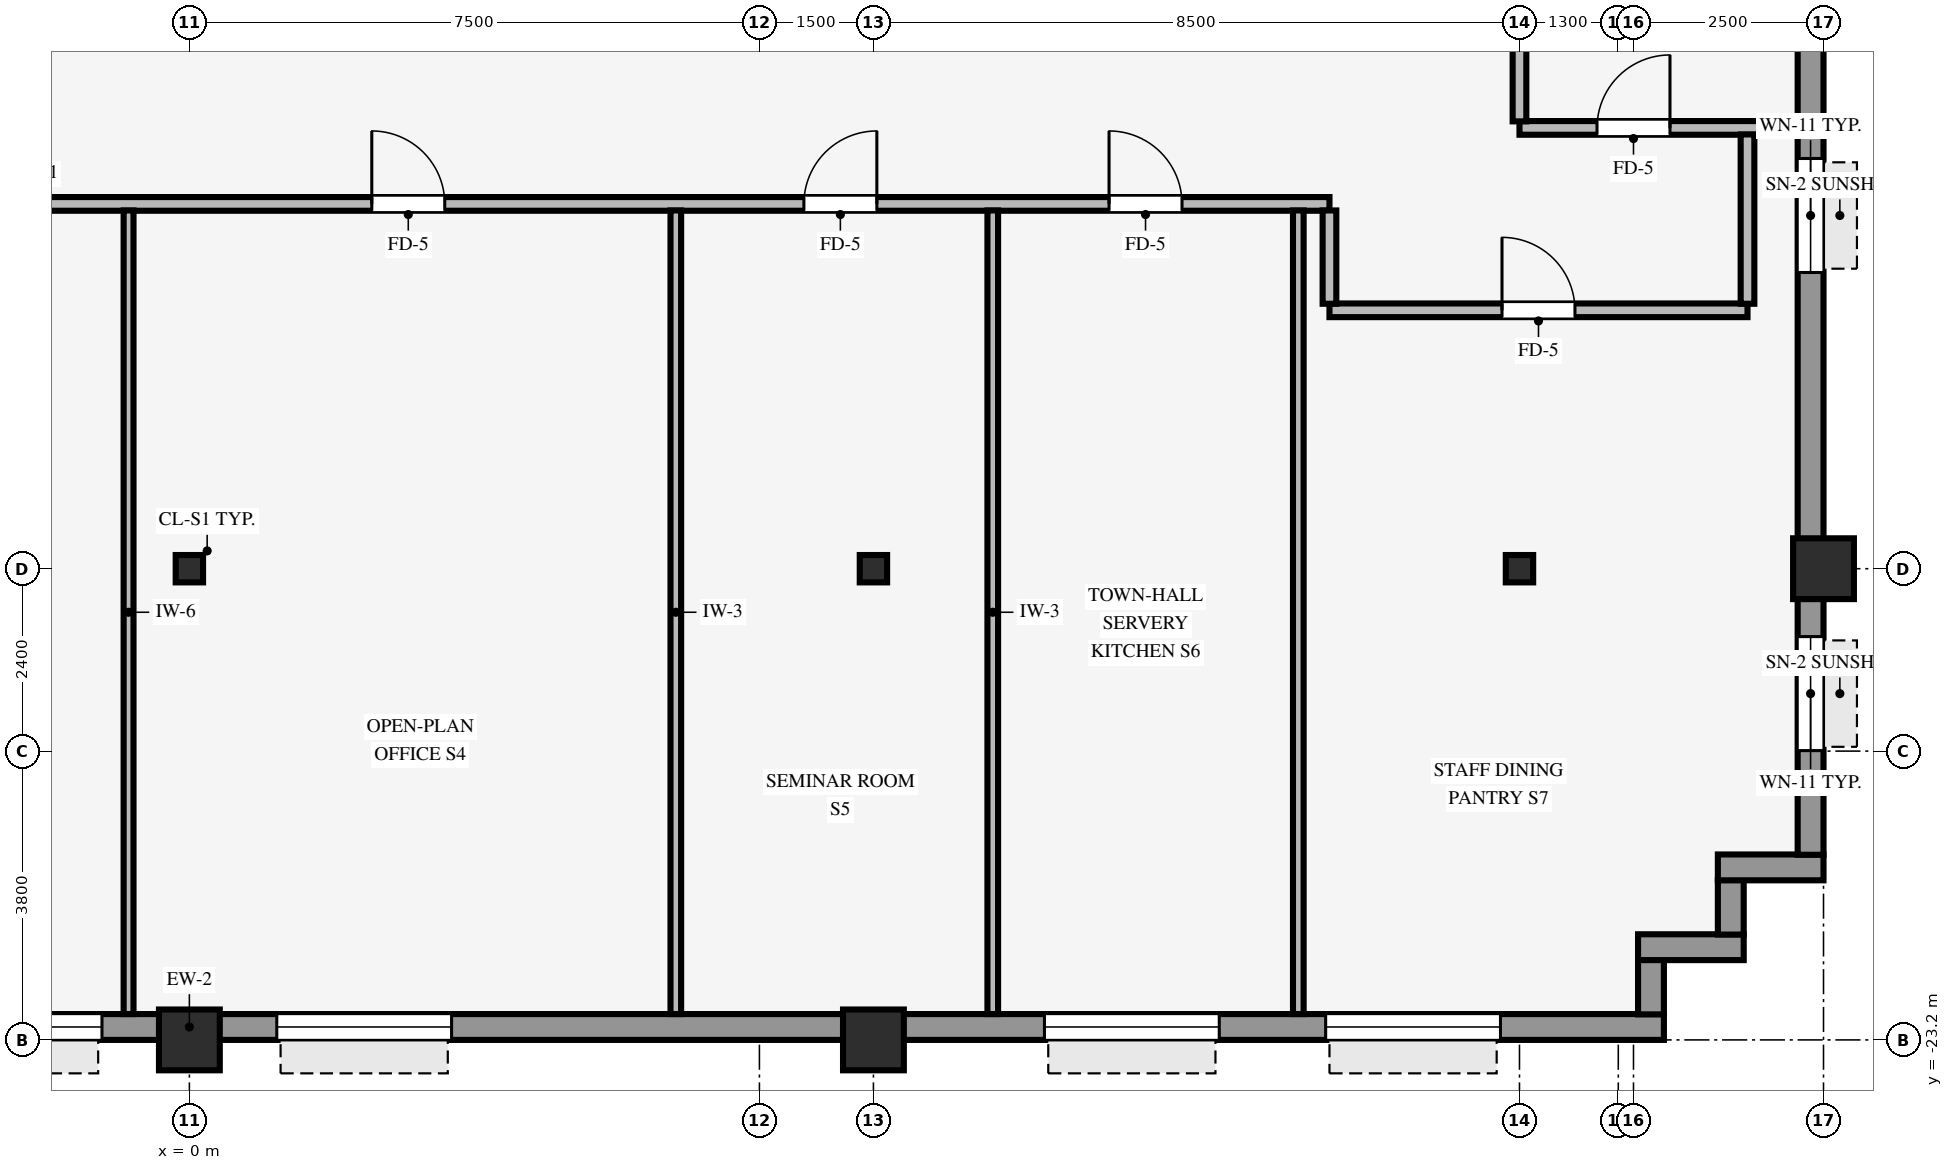
"""IFC4 building model, lengths in metres.
Left out: names, types, materials, properties, quantities, classifications, styles, units other than length and angle.
Written with IfcOpenShell. Run it as: python <this file> out.ifc"""

import sys

from ifc_helpers import new_model, si_unit, direction, frame, frame_2d, origin, origin_2d, place, context, subcontext, project, spatial, rectangle, hollow_rectangle, i_section, extrude, source, transform, mapped, element, fill, save


model = new_model("IFC4")
c1 = context("Model", 3, precision=1e-05, world=origin(), true_north=direction((0.0, 1.0)))
c2 = subcontext(c1, "Body", "Model", "MODEL_VIEW")
j1 = project(units=[si_unit("LENGTHUNIT", "METRE"), si_unit("PLANEANGLEUNIT", "RADIAN")], contexts=[c1])
p1 = place(None, origin())
s1 = spatial("IfcSite", under=j1, at=p1, CompositionType="ELEMENT")
p2 = place(p1, origin())
s2 = spatial("IfcBuilding", under=s1, at=p2, CompositionType="ELEMENT")
p3 = place(p2, frame((0.0, 0.0, 56.8)))
s3 = spatial("IfcBuildingStorey", under=s2, at=p3, CompositionType="ELEMENT", Elevation=56.8)
p4 = place(p3, frame((21.5, -17.0, -0.4), z_axis=(0.0, 0.0, 1.0), x_axis=(1.0, 0.0, 0.0)))
e1 = element("IfcColumn", 1, at=p4, inside=s3, PredefinedType="COLUMN", context=c2, shape_type="SweptSolid", body=[
    extrude(hollow_rectangle(XDim=0.8, YDim=0.8, WallThickness=0.055, InnerFilletRadius=0.055, OuterFilletRadius=0.11, at=origin_2d()), origin(), (0.0, 0.0, 1.0), 3.77),
])
for number, where, z_axis, x_axis in (
    (2, (0.0, -23.2, 0.0), (0.0, 0.0, 1.0), (1.0, 0.0, 0.0)),
    (3, (9.0, -23.2, 0.0), (0.0, 0.0, 1.0), (1.0, 0.0, 0.0)),
):
    element("IfcColumn", number, at=place(p3, frame(where, z_axis=z_axis, x_axis=x_axis)), inside=s3, PredefinedType="COLUMN", context=c2, shape_type="SweptSolid", body=[
        extrude(hollow_rectangle(XDim=0.8, YDim=0.8, WallThickness=0.055, InnerFilletRadius=0.055, OuterFilletRadius=0.11, at=origin_2d()), origin(), (0.0, 0.0, 1.0), 3.37),
    ])
for number, where, z_axis, x_axis in (
    (4, (0.0, -17.0, 0.0), (0.0, 0.0, 1.0), (1.0, 0.0, 0.0)),
    (5, (9.0, -17.0, 0.0), (0.0, 0.0, 1.0), (1.0, 0.0, 0.0)),
    (6, (17.5, -17.0, 0.0), (0.0, 0.0, 1.0), (1.0, 0.0, 0.0)),
):
    element("IfcColumn", number, at=place(p3, frame(where, z_axis=z_axis, x_axis=x_axis)), inside=s3, PredefinedType="COLUMN", context=c2, shape_type="SweptSolid", body=[
        extrude(i_section(OverallWidth=0.36, OverallDepth=0.36, WebThickness=0.021, FlangeThickness=0.021, FilletRadius=0.018, at=origin_2d()), origin(), (0.0, 0.0, 1.0), 3.37),
    ])
p5 = place(p3, frame((-19.4, -23.03, 0.0), z_axis=(0.0, 0.0, 1.0), x_axis=(1.0, 0.0, 0.0)))
e7 = element("IfcWall", 7, at=p5, inside=s3, PredefinedType="STANDARD", context=c2, shape_type="SweptSolid", body=[
    extrude(rectangle(XDim=38.8, YDim=0.34, at=frame_2d((19.4, 0.0))), origin(), (0.0, 0.0, 1.0), 2.705),
])
p6 = place(p5, frame((3.05, 0.0, 0.8)))
e8 = element("IfcOpeningElement", 8, at=p6, cuts=e7, PredefinedType="OPENING", context=c2, shape_type="SweptSolid", body=[
    extrude(rectangle(XDim=2.3, YDim=1.62, at=frame_2d((1.15, 0.81))), frame((0.0, 0.18, 0.0), z_axis=(0.0, -1.0, 0.0), x_axis=(1.0, 0.0, 0.0)), (0.0, 0.0, 1.0), 0.36),
])
p7 = place(p5, frame((5.85, 0.0, 0.8)))
e9 = element("IfcOpeningElement", 9, at=p7, cuts=e7, PredefinedType="OPENING", context=c2, shape_type="SweptSolid", body=[
    extrude(rectangle(XDim=2.3, YDim=1.62, at=frame_2d((1.15, 0.81))), frame((0.0, 0.18, 0.0), z_axis=(0.0, -1.0, 0.0), x_axis=(1.0, 0.0, 0.0)), (0.0, 0.0, 1.0), 0.36),
])
p8 = place(p5, frame((11.35, 0.0, 0.8)))
e10 = element("IfcOpeningElement", 10, at=p8, cuts=e7, PredefinedType="OPENING", context=c2, shape_type="SweptSolid", body=[
    extrude(rectangle(XDim=2.3, YDim=1.62, at=frame_2d((1.15, 0.81))), frame((0.0, 0.18, 0.0), z_axis=(0.0, -1.0, 0.0), x_axis=(1.0, 0.0, 0.0)), (0.0, 0.0, 1.0), 0.36),
])
p9 = place(p5, frame((15.95, 0.0, 0.8)))
e11 = element("IfcOpeningElement", 11, at=p9, cuts=e7, PredefinedType="OPENING", context=c2, shape_type="SweptSolid", body=[
    extrude(rectangle(XDim=2.3, YDim=1.62, at=frame_2d((1.15, 0.81))), frame((0.0, 0.18, 0.0), z_axis=(0.0, -1.0, 0.0), x_axis=(1.0, 0.0, 0.0)), (0.0, 0.0, 1.0), 0.36),
])
p10 = place(p5, frame((20.55, 0.0, 0.8)))
e12 = element("IfcOpeningElement", 12, at=p10, cuts=e7, PredefinedType="OPENING", context=c2, shape_type="SweptSolid", body=[
    extrude(rectangle(XDim=2.3, YDim=1.62, at=frame_2d((1.15, 0.81))), frame((0.0, 0.18, 0.0), z_axis=(0.0, -1.0, 0.0), x_axis=(1.0, 0.0, 0.0)), (0.0, 0.0, 1.0), 0.36),
])
p11 = place(p5, frame((30.65, 0.0, 0.8)))
e13 = element("IfcOpeningElement", 13, at=p11, cuts=e7, PredefinedType="OPENING", context=c2, shape_type="SweptSolid", body=[
    extrude(rectangle(XDim=2.3, YDim=1.62, at=frame_2d((1.15, 0.81))), frame((0.0, 0.18, 0.0), z_axis=(0.0, -1.0, 0.0), x_axis=(1.0, 0.0, 0.0)), (0.0, 0.0, 1.0), 0.36),
])
p12 = place(p5, frame((34.35, 0.0, 0.8)))
e14 = element("IfcOpeningElement", 14, at=p12, cuts=e7, PredefinedType="OPENING", context=c2, shape_type="SweptSolid", body=[
    extrude(rectangle(XDim=2.3, YDim=1.62, at=frame_2d((1.15, 0.81))), frame((0.0, 0.18, 0.0), z_axis=(0.0, -1.0, 0.0), x_axis=(1.0, 0.0, 0.0)), (0.0, 0.0, 1.0), 0.36),
])
p13 = place(p3, frame((19.23, -22.864, 0.0), z_axis=(0.0, 0.0, 1.0), x_axis=(0.0, 1.0, 0.0)))
e15 = element("IfcWall", 15, at=p13, inside=s3, PredefinedType="STANDARD", context=c2, shape_type="SweptSolid", body=[
    extrude(rectangle(XDim=0.718, YDim=0.34, at=frame_2d((0.359, 0.0))), origin(), (0.0, 0.0, 1.0), 3.36),
])
p14 = place(p3, frame((19.06, -21.98, 0.0), z_axis=(0.0, 0.0, 1.0), x_axis=(1.0, 0.0, 0.0)))
e16 = element("IfcWall", 16, at=p14, inside=s3, PredefinedType="STANDARD", context=c2, shape_type="SweptSolid", body=[
    extrude(rectangle(XDim=1.39, YDim=0.34, at=frame_2d((0.695, 0.0))), origin(), (0.0, 0.0, 1.0), 3.36),
])
p15 = place(p3, frame((20.28, -21.814, 0.0), z_axis=(0.0, 0.0, 1.0), x_axis=(0.0, 1.0, 0.0)))
e17 = element("IfcWall", 17, at=p15, inside=s3, PredefinedType="STANDARD", context=c2, shape_type="SweptSolid", body=[
    extrude(rectangle(XDim=0.718, YDim=0.34, at=frame_2d((0.359, 0.0))), origin(), (0.0, 0.0, 1.0), 3.36),
])
p16 = place(p3, frame((20.11, -20.93, 0.0), z_axis=(0.0, 0.0, 1.0), x_axis=(1.0, 0.0, 0.0)))
e18 = element("IfcWall", 18, at=p16, inside=s3, PredefinedType="STANDARD", context=c2, shape_type="SweptSolid", body=[
    extrude(rectangle(XDim=1.39, YDim=0.34, at=frame_2d((0.695, 0.0))), origin(), (0.0, 0.0, 1.0), 3.36),
])
p17 = place(p3, frame((21.33, -20.764, 0.0), z_axis=(0.0, 0.0, 1.0), x_axis=(0.0, 1.0, 0.0)))
e19 = element("IfcWall", 19, at=p17, inside=s3, PredefinedType="STANDARD", context=c2, shape_type="SweptSolid", body=[
    extrude(rectangle(XDim=41.528, YDim=0.34, at=frame_2d((20.764, 0.0))), origin(), (0.0, 0.0, 1.0), 2.705),
])
p18 = place(p17, frame((26.014, 0.0, 0.0), z_axis=(0.0, 0.0, 1.0), x_axis=(-1.0, 0.0, 0.0)))
e20 = element("IfcOpeningElement", 20, at=p18, cuts=e19, PredefinedType="OPENING", context=c2, shape_type="SweptSolid", body=[
    extrude(rectangle(XDim=1.05, YDim=2.1, at=frame_2d((0.525, 1.05))), frame((0.0, 0.18, 0.0), z_axis=(0.0, -1.0, 0.0), x_axis=(1.0, 0.0, 0.0)), (0.0, 0.0, 1.0), 0.36),
])
p19 = place(p17, frame((1.371, 0.0, 0.8)))
e21 = element("IfcOpeningElement", 21, at=p19, cuts=e19, PredefinedType="OPENING", context=c2, shape_type="SweptSolid", body=[
    extrude(rectangle(XDim=1.5, YDim=1.6, at=frame_2d((0.75, 0.8))), frame((0.0, 0.18, 0.0), z_axis=(0.0, -1.0, 0.0), x_axis=(1.0, 0.0, 0.0)), (0.0, 0.0, 1.0), 0.36),
])
p20 = place(p17, frame((7.662, 0.0, 0.8)))
e22 = element("IfcOpeningElement", 22, at=p20, cuts=e19, PredefinedType="OPENING", context=c2, shape_type="SweptSolid", body=[
    extrude(rectangle(XDim=1.5, YDim=1.6, at=frame_2d((0.75, 0.8))), frame((0.0, 0.18, 0.0), z_axis=(0.0, -1.0, 0.0), x_axis=(1.0, 0.0, 0.0)), (0.0, 0.0, 1.0), 0.36),
])
p21 = place(p17, frame((12.603, 0.0, 0.8)))
e23 = element("IfcOpeningElement", 23, at=p21, cuts=e19, PredefinedType="OPENING", context=c2, shape_type="SweptSolid", body=[
    extrude(rectangle(XDim=1.5, YDim=1.6, at=frame_2d((0.75, 0.8))), frame((0.0, 0.18, 0.0), z_axis=(0.0, -1.0, 0.0), x_axis=(1.0, 0.0, 0.0)), (0.0, 0.0, 1.0), 0.36),
])
p22 = place(p17, frame((16.644, 0.0, 0.8)))
e24 = element("IfcOpeningElement", 24, at=p22, cuts=e19, PredefinedType="OPENING", context=c2, shape_type="SweptSolid", body=[
    extrude(rectangle(XDim=1.5, YDim=1.6, at=frame_2d((0.75, 0.8))), frame((0.0, 0.18, 0.0), z_axis=(0.0, -1.0, 0.0), x_axis=(1.0, 0.0, 0.0)), (0.0, 0.0, 1.0), 0.36),
])
p23 = place(p17, frame((22.485, 0.0, 0.8)))
e25 = element("IfcOpeningElement", 25, at=p23, cuts=e19, PredefinedType="OPENING", context=c2, shape_type="SweptSolid", body=[
    extrude(rectangle(XDim=1.5, YDim=1.6, at=frame_2d((0.75, 0.8))), frame((0.0, 0.18, 0.0), z_axis=(0.0, -1.0, 0.0), x_axis=(1.0, 0.0, 0.0)), (0.0, 0.0, 1.0), 0.36),
])
p24 = place(p17, frame((27.426, 0.0, 0.8)))
e26 = element("IfcOpeningElement", 26, at=p24, cuts=e19, PredefinedType="OPENING", context=c2, shape_type="SweptSolid", body=[
    extrude(rectangle(XDim=1.5, YDim=1.6, at=frame_2d((0.75, 0.8))), frame((0.0, 0.18, 0.0), z_axis=(0.0, -1.0, 0.0), x_axis=(1.0, 0.0, 0.0)), (0.0, 0.0, 1.0), 0.36),
])
p25 = place(p17, frame((32.366, 0.0, 0.8)))
e27 = element("IfcOpeningElement", 27, at=p25, cuts=e19, PredefinedType="OPENING", context=c2, shape_type="SweptSolid", body=[
    extrude(rectangle(XDim=1.5, YDim=1.6, at=frame_2d((0.75, 0.8))), frame((0.0, 0.18, 0.0), z_axis=(0.0, -1.0, 0.0), x_axis=(1.0, 0.0, 0.0)), (0.0, 0.0, 1.0), 0.36),
])
p26 = place(p17, frame((38.657, 0.0, 0.8)))
e28 = element("IfcOpeningElement", 28, at=p26, cuts=e19, PredefinedType="OPENING", context=c2, shape_type="SweptSolid", body=[
    extrude(rectangle(XDim=1.5, YDim=1.6, at=frame_2d((0.75, 0.8))), frame((0.0, 0.18, 0.0), z_axis=(0.0, -1.0, 0.0), x_axis=(1.0, 0.0, 0.0)), (0.0, 0.0, 1.0), 0.36),
])
p27 = place(p3, frame((15.0, -13.6, 0.0), z_axis=(0.0, 0.0, 1.0), x_axis=(1.0, 0.0, 0.0)))
e29 = element("IfcWall", 29, at=p27, inside=s3, PredefinedType="PARTITIONING", context=c2, shape_type="SweptSolid", body=[
    extrude(rectangle(XDim=5.5, YDim=0.18, at=frame_2d((2.75, 0.0))), origin(), (0.0, 0.0, 1.0), 2.942),
])
p28 = place(p27, frame((2.27, 0.0, 0.0)))
e30 = element("IfcOpeningElement", 30, at=p28, cuts=e29, PredefinedType="OPENING", context=c2, shape_type="SweptSolid", body=[
    extrude(rectangle(XDim=0.96, YDim=2.1, at=frame_2d((0.48, 1.05))), frame((0.0, 0.1, 0.0), z_axis=(0.0, -1.0, 0.0), x_axis=(1.0, 0.0, 0.0)), (0.0, 0.0, 1.0), 0.2),
])
p29 = place(p3, frame((-15.0, -12.2, 0.0), z_axis=(0.0, 0.0, 1.0), x_axis=(1.0, 0.0, 0.0)))
e31 = element("IfcWall", 31, at=p29, inside=s3, PredefinedType="PARTITIONING", context=c2, shape_type="SweptSolid", body=[
    extrude(rectangle(XDim=30.0, YDim=0.18, at=frame_2d((15.0, 0.0))), origin(), (0.0, 0.0, 1.0), 3.36),
])
p30 = place(p29, frame((17.4, 0.0, 0.0)))
e32 = element("IfcOpeningElement", 32, at=p30, cuts=e31, PredefinedType="OPENING", context=c2, shape_type="SweptSolid", body=[
    extrude(rectangle(XDim=0.96, YDim=2.1, at=frame_2d((0.48, 1.05))), frame((0.0, 0.1, 0.0), z_axis=(0.0, -1.0, 0.0), x_axis=(1.0, 0.0, 0.0)), (0.0, 0.0, 1.0), 0.2),
])
p31 = place(p29, frame((7.655, 0.0, 0.0)))
e33 = element("IfcOpeningElement", 33, at=p31, cuts=e31, PredefinedType="OPENING", context=c2, shape_type="SweptSolid", body=[
    extrude(rectangle(XDim=0.96, YDim=2.1, at=frame_2d((0.48, 1.05))), frame((0.0, 0.1, 0.0), z_axis=(0.0, -1.0, 0.0), x_axis=(1.0, 0.0, 0.0)), (0.0, 0.0, 1.0), 0.2),
])
p32 = place(p29, frame((1.755, 0.0, 0.0)))
e34 = element("IfcOpeningElement", 34, at=p32, cuts=e31, PredefinedType="OPENING", context=c2, shape_type="SweptSolid", body=[
    extrude(rectangle(XDim=0.96, YDim=2.1, at=frame_2d((0.48, 1.05))), frame((0.0, 0.1, 0.0), z_axis=(0.0, -1.0, 0.0), x_axis=(1.0, 0.0, 0.0)), (0.0, 0.0, 1.0), 0.2),
])
p33 = place(p29, frame((27.1, 0.0, 0.0)))
e35 = element("IfcOpeningElement", 35, at=p33, cuts=e31, PredefinedType="OPENING", context=c2, shape_type="SweptSolid", body=[
    extrude(rectangle(XDim=0.96, YDim=2.1, at=frame_2d((0.48, 1.05))), frame((0.0, 0.1, 0.0), z_axis=(0.0, -1.0, 0.0), x_axis=(1.0, 0.0, 0.0)), (0.0, 0.0, 1.0), 0.2),
])
p34 = place(p29, frame((23.085, 0.0, 0.0)))
e36 = element("IfcOpeningElement", 36, at=p34, cuts=e31, PredefinedType="OPENING", context=c2, shape_type="SweptSolid", body=[
    extrude(rectangle(XDim=0.96, YDim=2.1, at=frame_2d((0.48, 1.05))), frame((0.0, 0.1, 0.0), z_axis=(0.0, -1.0, 0.0), x_axis=(1.0, 0.0, 0.0)), (0.0, 0.0, 1.0), 0.2),
])
p35 = place(p3, frame((17.5, -11.2, 0.0), z_axis=(0.0, 0.0, 1.0), x_axis=(1.0, 0.0, 0.0)))
e37 = element("IfcWall", 37, at=p35, inside=s3, PredefinedType="PARTITIONING", context=c2, shape_type="SweptSolid", body=[
    extrude(rectangle(XDim=3.66, YDim=0.18, at=frame_2d((1.83, 0.0))), origin(), (0.0, 0.0, 1.0), 3.36),
])
p36 = place(p35, frame((1.02, 0.0, 0.0)))
e38 = element("IfcOpeningElement", 38, at=p36, cuts=e37, PredefinedType="OPENING", context=c2, shape_type="SweptSolid", body=[
    extrude(rectangle(XDim=0.96, YDim=2.1, at=frame_2d((0.48, 1.05))), frame((0.0, 0.1, 0.0), z_axis=(0.0, -1.0, 0.0), x_axis=(1.0, 0.0, 0.0)), (0.0, 0.0, 1.0), 0.2),
])
p37 = place(p3, frame((-0.8, -22.86, 0.0), z_axis=(0.0, 0.0, 1.0), x_axis=(0.0, 1.0, 0.0)))
e39 = element("IfcWall", 39, at=p37, inside=s3, PredefinedType="PARTITIONING", context=c2, shape_type="SweptSolid", body=[
    extrude(rectangle(XDim=10.574, YDim=0.13, at=frame_2d((5.287, 0.0))), origin(), (0.0, 0.0, 1.0), 3.36),
])
for number, where, z_axis, x_axis in (
    (40, (6.4, -22.86, 0.0), (0.0, 0.0, 1.0), (0.0, 1.0, 0.0)),
    (41, (10.57, -22.86, 0.0), (0.0, 0.0, 1.0), (0.0, 1.0, 0.0)),
    (42, (14.59, -22.86, 0.0), (0.0, 0.0, 1.0), (0.0, 1.0, 0.0)),
):
    element("IfcWall", number, at=place(p3, frame(where, z_axis=z_axis, x_axis=x_axis)), inside=s3, PredefinedType="PARTITIONING", context=c2, shape_type="SweptSolid", body=[
        extrude(rectangle(XDim=10.574, YDim=0.14, at=frame_2d((5.287, 0.0))), origin(), (0.0, 0.0, 1.0), 3.36),
    ])
p38 = place(p3, frame((15.0, -13.514, 0.0), z_axis=(0.0, 0.0, 1.0), x_axis=(0.0, 1.0, 0.0)))
e43 = element("IfcWall", 43, at=p38, inside=s3, PredefinedType="PARTITIONING", context=c2, shape_type="SweptSolid", body=[
    extrude(rectangle(XDim=1.228, YDim=0.18, at=frame_2d((0.614, 0.0))), origin(), (0.0, 0.0, 1.0), 3.36),
])
p39 = place(p3, frame((17.5, -11.114, 0.0), z_axis=(0.0, 0.0, 1.0), x_axis=(0.0, 1.0, 0.0)))
e44 = element("IfcWall", 44, at=p39, inside=s3, PredefinedType="PARTITIONING", context=c2, shape_type="SweptSolid", body=[
    extrude(rectangle(XDim=0.968, YDim=0.18, at=frame_2d((0.484, 0.0))), origin(), (0.0, 0.0, 1.0), 2.738),
])
p40 = place(p3, frame((20.5, -13.514, 0.0), z_axis=(0.0, 0.0, 1.0), x_axis=(0.0, 1.0, 0.0)))
e45 = element("IfcWall", 45, at=p40, inside=s3, PredefinedType="PARTITIONING", context=c2, shape_type="SweptSolid", body=[
    extrude(rectangle(XDim=2.228, YDim=0.18, at=frame_2d((1.114, 0.0))), origin(), (0.0, 0.0, 1.0), 3.36),
])
m1 = source(origin(), c2, "Body", "SweptSolid", [
    extrude(rectangle(XDim=2.3, YDim=1.62, at=frame_2d((1.15, 0.81))), frame((0.0, 0.03, 0.0), z_axis=(0.0, -1.0, 0.0), x_axis=(1.0, 0.0, 0.0)), (0.0, 0.0, 1.0), 0.06),
])
p41 = place(p9, origin())
e46 = element("IfcWindow", 46, at=p41, inside=s3, PartitioningType="SINGLE_PANEL", PredefinedType="WINDOW", context=c2, shape_type="MappedRepresentation", body=[
    mapped(m1, transform((0.0, 0.0, 0.0), scale=1.0)),
])
fill(e11, e46)
p42 = place(p10, origin())
e47 = element("IfcWindow", 47, at=p42, inside=s3, PartitioningType="SINGLE_PANEL", PredefinedType="WINDOW", context=c2, shape_type="MappedRepresentation", body=[
    mapped(m1, transform((0.0, 0.0, 0.0), scale=1.0)),
])
fill(e12, e47)
p43 = place(p11, origin())
e48 = element("IfcWindow", 48, at=p43, inside=s3, PartitioningType="SINGLE_PANEL", PredefinedType="WINDOW", context=c2, shape_type="MappedRepresentation", body=[
    mapped(m1, transform((0.0, 0.0, 0.0), scale=1.0)),
])
fill(e13, e48)
p44 = place(p12, origin())
e49 = element("IfcWindow", 49, at=p44, inside=s3, PartitioningType="SINGLE_PANEL", PredefinedType="WINDOW", context=c2, shape_type="MappedRepresentation", body=[
    mapped(m1, transform((0.0, 0.0, 0.0), scale=1.0)),
])
fill(e14, e49)
m2 = source(origin(), c2, "Body", "SweptSolid", [
    extrude(rectangle(XDim=1.5, YDim=1.6, at=frame_2d((0.75, 0.8))), frame((0.0, 0.03, 0.0), z_axis=(0.0, -1.0, 0.0), x_axis=(1.0, 0.0, 0.0)), (0.0, 0.0, 1.0), 0.06),
])
p45 = place(p19, origin())
e50 = element("IfcWindow", 50, at=p45, inside=s3, PartitioningType="SINGLE_PANEL", PredefinedType="WINDOW", context=c2, shape_type="MappedRepresentation", body=[
    mapped(m2, transform((0.0, 0.0, 0.0), scale=1.0)),
])
fill(e21, e50)
p46 = place(p20, origin())
e51 = element("IfcWindow", 51, at=p46, inside=s3, PartitioningType="SINGLE_PANEL", PredefinedType="WINDOW", context=c2, shape_type="MappedRepresentation", body=[
    mapped(m2, transform((0.0, 0.0, 0.0), scale=1.0)),
])
fill(e22, e51)
m3 = source(origin(), c2, "Body", "SweptSolid", [
    extrude(rectangle(XDim=0.96, YDim=2.1, at=frame_2d((0.48, 1.05))), frame((0.0, 0.025, 0.0), z_axis=(0.0, -1.0, 0.0), x_axis=(1.0, 0.0, 0.0)), (0.0, 0.0, 1.0), 0.05),
])
p47 = place(p30, origin())
e52 = element("IfcDoor", 52, at=p47, inside=s3, OperationType="SINGLE_SWING_LEFT", PredefinedType="DOOR", context=c2, shape_type="MappedRepresentation", body=[
    mapped(m3, transform((0.0, 0.0, 0.0), scale=1.0)),
])
fill(e32, e52)
p48 = place(p28, origin())
e53 = element("IfcDoor", 53, at=p48, inside=s3, OperationType="SINGLE_SWING_LEFT", PredefinedType="DOOR", context=c2, shape_type="MappedRepresentation", body=[
    mapped(m3, transform((0.0, 0.0, 0.0), scale=1.0)),
])
fill(e30, e53)
p49 = place(p33, origin())
e54 = element("IfcDoor", 54, at=p49, inside=s3, OperationType="SINGLE_SWING_LEFT", PredefinedType="DOOR", context=c2, shape_type="MappedRepresentation", body=[
    mapped(m3, transform((0.0, 0.0, 0.0), scale=1.0)),
])
fill(e35, e54)
p50 = place(p34, origin())
e55 = element("IfcDoor", 55, at=p50, inside=s3, OperationType="SINGLE_SWING_RIGHT", PredefinedType="DOOR", context=c2, shape_type="MappedRepresentation", body=[
    mapped(m3, transform((0.0, 0.0, 0.0), scale=1.0)),
])
fill(e36, e55)
p51 = place(p36, origin())
e56 = element("IfcDoor", 56, at=p51, inside=s3, OperationType="SINGLE_SWING_RIGHT", PredefinedType="DOOR", context=c2, shape_type="MappedRepresentation", body=[
    mapped(m3, transform((0.0, 0.0, 0.0), scale=1.0)),
])
fill(e38, e56)
save(model, sys.argv[1])
